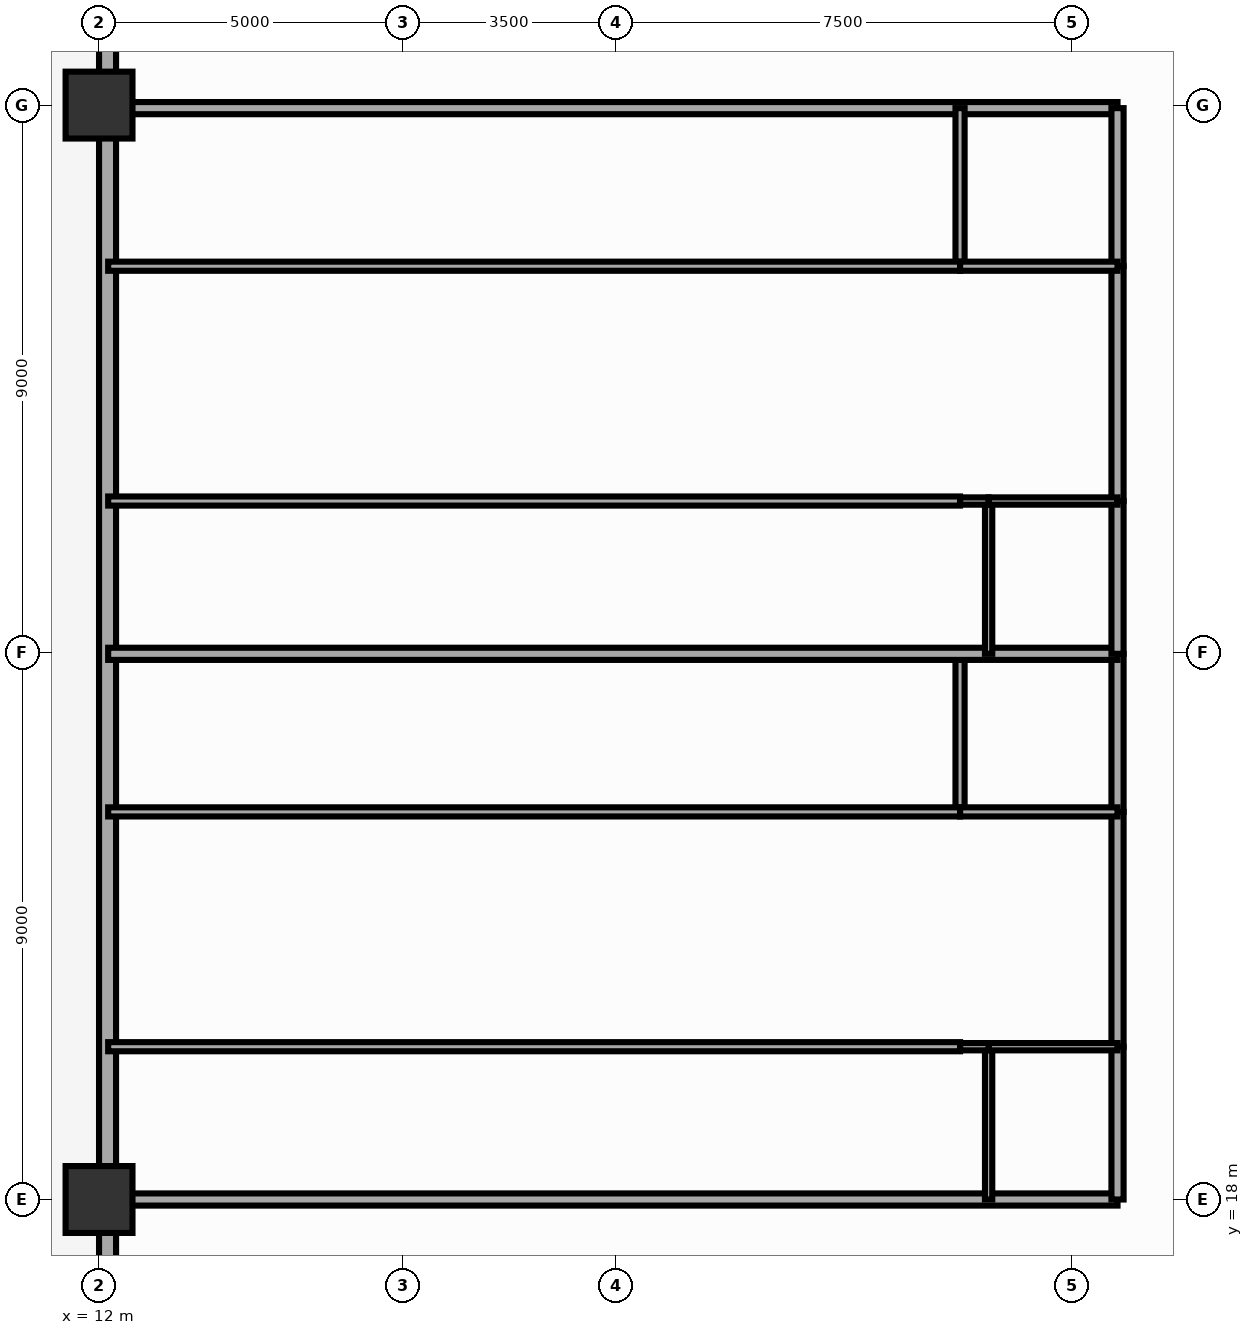
"""IFC4 building model, lengths in metres.
Left out: names, types, materials, properties, quantities, classifications, styles, units other than length and angle.
Written with IfcOpenShell. Run it as: python <this file> out.ifc"""

import sys

from ifc_helpers import new_model, si_unit, direction, frame, frame_2d, origin, origin_2d, place, context, subcontext, project, spatial, rectangle, extrude, source, transform, mapped, element, fill, save


model = new_model("IFC4")
c1 = context("Model", 3, precision=1e-05, world=origin(), true_north=direction((0.0, 1.0)))
c2 = subcontext(c1, "Body", "Model", "MODEL_VIEW")
j1 = project(units=[si_unit("LENGTHUNIT", "METRE"), si_unit("PLANEANGLEUNIT", "RADIAN")], contexts=[c1])
p1 = place(None, origin())
s1 = spatial("IfcSite", under=j1, at=p1, CompositionType="ELEMENT")
p2 = place(p1, origin())
s2 = spatial("IfcBuilding", under=s1, at=p2, CompositionType="ELEMENT")
p3 = place(p2, frame((0.0, 0.0, 19.4)))
s3 = spatial("IfcBuildingStorey", under=s2, at=p3, CompositionType="ELEMENT", Elevation=19.4)
m1 = source(origin(), c2, "Body", "SweptSolid", [
    extrude(rectangle(XDim=1.1, YDim=1.1, at=origin_2d()), origin(), (0.0, 0.0, 1.0), 3.0),
])
for number, where, z_axis, x_axis in (
    (1, (12.0, 36.0, 0.0), (0.0, 0.0, 1.0), (1.0, 0.0, 0.0)),
    (2, (12.0, 18.0, 0.0), (0.0, 0.0, 1.0), (1.0, 0.0, 0.0)),
):
    element("IfcColumn", number, at=place(p3, frame(where, z_axis=z_axis, x_axis=x_axis)), inside=s3, PredefinedType="COLUMN", context=c2, shape_type="MappedRepresentation", body=[
        mapped(m1, transform((0.0, 0.0, 0.0), scale=1.0)),
    ])
p4 = place(p3, frame((12.14, 6.5, 0.0), z_axis=(0.0, 0.0, 1.0), x_axis=(0.0, 1.0, 0.0)))
e3 = element("IfcWall", 3, at=p4, inside=s3, PredefinedType="SOLIDWALL", context=c2, shape_type="SweptSolid", body=[
    extrude(rectangle(XDim=41.0, YDim=0.28, at=frame_2d((20.5, 0.0))), origin(), (0.0, 0.0, 1.0), 2.28),
])
p5 = place(p4, frame((5.15, 0.0, 0.25)))
e4 = element("IfcOpeningElement", 4, at=p5, cuts=e3, PredefinedType="OPENING", context=c2, shape_type="SweptSolid", body=[
    extrude(rectangle(XDim=1.2, YDim=1.5, at=frame_2d((0.6, 0.75))), frame((0.0, 0.152, 0.0), z_axis=(0.0, -1.0, 0.0), x_axis=(1.0, 0.0, 0.0)), (0.0, 0.0, 1.0), 0.304),
])
p6 = place(p4, frame((12.352, 0.0, 0.25)))
e5 = element("IfcOpeningElement", 5, at=p6, cuts=e3, PredefinedType="OPENING", context=c2, shape_type="SweptSolid", body=[
    extrude(rectangle(XDim=1.2, YDim=1.5, at=frame_2d((0.6, 0.75))), frame((0.0, 0.152, 0.0), z_axis=(0.0, -1.0, 0.0), x_axis=(1.0, 0.0, 0.0)), (0.0, 0.0, 1.0), 0.304),
])
p7 = place(p4, frame((15.344, 0.0, 0.25)))
e6 = element("IfcOpeningElement", 6, at=p7, cuts=e3, PredefinedType="OPENING", context=c2, shape_type="SweptSolid", body=[
    extrude(rectangle(XDim=1.2, YDim=1.5, at=frame_2d((0.6, 0.75))), frame((0.0, 0.152, 0.0), z_axis=(0.0, -1.0, 0.0), x_axis=(1.0, 0.0, 0.0)), (0.0, 0.0, 1.0), 0.304),
])
p8 = place(p4, frame((18.575, 0.0, 0.25)))
e7 = element("IfcOpeningElement", 7, at=p8, cuts=e3, PredefinedType="OPENING", context=c2, shape_type="SweptSolid", body=[
    extrude(rectangle(XDim=1.2, YDim=1.5, at=frame_2d((0.6, 0.75))), frame((0.0, 0.152, 0.0), z_axis=(0.0, -1.0, 0.0), x_axis=(1.0, 0.0, 0.0)), (0.0, 0.0, 1.0), 0.304),
])
p9 = place(p4, frame((21.132, 0.0, 0.25)))
e8 = element("IfcOpeningElement", 8, at=p9, cuts=e3, PredefinedType="OPENING", context=c2, shape_type="SweptSolid", body=[
    extrude(rectangle(XDim=1.2, YDim=1.5, at=frame_2d((0.6, 0.75))), frame((0.0, 0.152, 0.0), z_axis=(0.0, -1.0, 0.0), x_axis=(1.0, 0.0, 0.0)), (0.0, 0.0, 1.0), 0.304),
])
p10 = place(p4, frame((24.319, 0.0, 0.25)))
e9 = element("IfcOpeningElement", 9, at=p10, cuts=e3, PredefinedType="OPENING", context=c2, shape_type="SweptSolid", body=[
    extrude(rectangle(XDim=1.2, YDim=1.5, at=frame_2d((0.6, 0.75))), frame((0.0, 0.152, 0.0), z_axis=(0.0, -1.0, 0.0), x_axis=(1.0, 0.0, 0.0)), (0.0, 0.0, 1.0), 0.304),
])
p11 = place(p4, frame((27.38, 0.0, 0.25)))
e10 = element("IfcOpeningElement", 10, at=p11, cuts=e3, PredefinedType="OPENING", context=c2, shape_type="SweptSolid", body=[
    extrude(rectangle(XDim=1.2, YDim=1.5, at=frame_2d((0.6, 0.75))), frame((0.0, 0.152, 0.0), z_axis=(0.0, -1.0, 0.0), x_axis=(1.0, 0.0, 0.0)), (0.0, 0.0, 1.0), 0.304),
])
p12 = place(p4, frame((34.45, 0.0, 0.0)))
e11 = element("IfcOpeningElement", 11, at=p12, cuts=e3, PredefinedType="OPENING", context=c2, shape_type="SweptSolid", body=[
    extrude(rectangle(XDim=1.6, YDim=2.15, at=frame_2d((0.8, 1.075))), frame((0.0, 0.152, 0.0), z_axis=(0.0, -1.0, 0.0), x_axis=(1.0, 0.0, 0.0)), (0.0, 0.0, 1.0), 0.304),
])
for number, where, z_axis, x_axis in (
    (12, (28.75, 18.0, 0.0), (0.0, 0.0, 1.0), (-1.0, 0.0, 0.0)),
    (13, (28.75, 35.95, 0.0), (0.0, 0.0, 1.0), (-1.0, 0.0, 0.0)),
):
    element("IfcWall", number, at=place(p3, frame(where, z_axis=z_axis, x_axis=x_axis)), inside=s3, PredefinedType="PARTITIONING", context=c2, shape_type="SweptSolid", body=[
        extrude(rectangle(XDim=16.6, YDim=0.2, at=frame_2d((8.3, 0.0))), origin(), (0.0, 0.0, 1.0), 2.24),
    ])
p13 = place(p3, frame((28.75, 18.0, 0.0), z_axis=(0.0, 0.0, 1.0), x_axis=(0.0, 1.0, 0.0)))
e14 = element("IfcWall", 14, at=p13, inside=s3, PredefinedType="PARTITIONING", context=c2, shape_type="SweptSolid", body=[
    extrude(rectangle(XDim=2.513, YDim=0.2, at=frame_2d((1.256, 0.0))), origin(), (0.0, 0.0, 1.0), 2.79),
])
p14 = place(p3, frame((28.75, 20.513, 0.0), z_axis=(0.0, 0.0, 1.0), x_axis=(0.0, 1.0, 0.0)))
e15 = element("IfcWall", 15, at=p14, inside=s3, PredefinedType="PARTITIONING", context=c2, shape_type="SweptSolid", body=[
    extrude(rectangle(XDim=3.862, YDim=0.2, at=frame_2d((1.931, 0.0))), origin(), (0.0, 0.0, 1.0), 2.79),
])
p15 = place(p14, frame((1.431, 0.0, 0.0)))
e16 = element("IfcOpeningElement", 16, at=p15, cuts=e15, PredefinedType="OPENING", context=c2, shape_type="SweptSolid", body=[
    extrude(rectangle(XDim=1.0, YDim=2.15, at=frame_2d((0.5, 1.075))), frame((0.0, 0.112, 0.0), z_axis=(0.0, -1.0, 0.0), x_axis=(1.0, 0.0, 0.0)), (0.0, 0.0, 1.0), 0.224),
])
p16 = place(p3, frame((28.75, 24.375, 0.0), z_axis=(0.0, 0.0, 1.0), x_axis=(0.0, 1.0, 0.0)))
e17 = element("IfcWall", 17, at=p16, inside=s3, PredefinedType="PARTITIONING", context=c2, shape_type="SweptSolid", body=[
    extrude(rectangle(XDim=2.6, YDim=0.2, at=frame_2d((1.3, 0.0))), origin(), (0.0, 0.0, 1.0), 2.79),
])
p17 = place(p3, frame((26.63, 18.0, 0.0), z_axis=(0.0, 0.0, 1.0), x_axis=(0.0, 1.0, 0.0)))
e18 = element("IfcWall", 18, at=p17, inside=s3, PredefinedType="PARTITIONING", context=c2, shape_type="SweptSolid", body=[
    extrude(rectangle(XDim=2.513, YDim=0.12, at=frame_2d((1.256, 0.0))), origin(), (0.0, 0.0, 1.0), 2.79),
])
p18 = place(p3, frame((26.16, 24.375, 0.0), z_axis=(0.0, 0.0, 1.0), x_axis=(0.0, 1.0, 0.0)))
e19 = element("IfcWall", 19, at=p18, inside=s3, PredefinedType="PARTITIONING", context=c2, shape_type="SweptSolid", body=[
    extrude(rectangle(XDim=2.6, YDim=0.15, at=frame_2d((1.3, 0.0))), origin(), (0.0, 0.0, 1.0), 2.79),
])
p19 = place(p3, frame((28.75, 20.513, 0.0), z_axis=(0.0, 0.0, 1.0), x_axis=(-1.0, 0.0, 0.0)))
e20 = element("IfcWall", 20, at=p19, inside=s3, PredefinedType="PARTITIONING", context=c2, shape_type="SweptSolid", body=[
    extrude(rectangle(XDim=2.12, YDim=0.12, at=frame_2d((1.06, 0.0))), origin(), (0.0, 0.0, 1.0), 2.79),
])
p20 = place(p19, frame((0.635, 0.0, 0.0)))
e21 = element("IfcOpeningElement", 21, at=p20, cuts=e20, PredefinedType="OPENING", context=c2, shape_type="SweptSolid", body=[
    extrude(rectangle(XDim=0.85, YDim=2.05, at=frame_2d((0.425, 1.025))), frame((0.0, 0.072, 0.0), z_axis=(0.0, -1.0, 0.0), x_axis=(1.0, 0.0, 0.0)), (0.0, 0.0, 1.0), 0.144),
])
p21 = place(p3, frame((26.63, 20.513, 0.0), z_axis=(0.0, 0.0, 1.0), x_axis=(-1.0, 0.0, 0.0)))
e22 = element("IfcWall", 22, at=p21, inside=s3, PredefinedType="PARTITIONING", context=c2, shape_type="SweptSolid", body=[
    extrude(rectangle(XDim=0.47, YDim=0.12, at=frame_2d((0.235, 0.0))), origin(), (0.0, 0.0, 1.0), 2.79),
])
p22 = place(p3, frame((26.16, 20.513, 0.0), z_axis=(0.0, 0.0, 1.0), x_axis=(-1.0, 0.0, 0.0)))
e23 = element("IfcWall", 23, at=p22, inside=s3, PredefinedType="PARTITIONING", context=c2, shape_type="SweptSolid", body=[
    extrude(rectangle(XDim=14.01, YDim=0.15, at=frame_2d((7.005, 0.0))), origin(), (0.0, 0.0, 1.0), 2.79),
])
p23 = place(p22, frame((6.029, 0.0, 0.0)))
e24 = element("IfcOpeningElement", 24, at=p23, cuts=e23, PredefinedType="OPENING", context=c2, shape_type="SweptSolid", body=[
    extrude(rectangle(XDim=0.9, YDim=2.1, at=frame_2d((0.45, 1.05))), frame((0.0, 0.087, 0.0), z_axis=(0.0, -1.0, 0.0), x_axis=(1.0, 0.0, 0.0)), (0.0, 0.0, 1.0), 0.174),
])
p24 = place(p3, frame((28.75, 24.375, 0.0), z_axis=(0.0, 0.0, 1.0), x_axis=(-1.0, 0.0, 0.0)))
e25 = element("IfcWall", 25, at=p24, inside=s3, PredefinedType="PARTITIONING", context=c2, shape_type="SweptSolid", body=[
    extrude(rectangle(XDim=2.59, YDim=0.15, at=frame_2d((1.295, 0.0))), origin(), (0.0, 0.0, 1.0), 2.79),
])
p25 = place(p24, frame((0.845, 0.0, 0.0)))
e26 = element("IfcOpeningElement", 26, at=p25, cuts=e25, PredefinedType="OPENING", context=c2, shape_type="SweptSolid", body=[
    extrude(rectangle(XDim=0.9, YDim=2.1, at=frame_2d((0.45, 1.05))), frame((0.0, 0.087, 0.0), z_axis=(0.0, -1.0, 0.0), x_axis=(1.0, 0.0, 0.0)), (0.0, 0.0, 1.0), 0.174),
])
p26 = place(p3, frame((26.16, 24.375, 0.0), z_axis=(0.0, 0.0, 1.0), x_axis=(-1.0, 0.0, 0.0)))
e27 = element("IfcWall", 27, at=p26, inside=s3, PredefinedType="PARTITIONING", context=c2, shape_type="SweptSolid", body=[
    extrude(rectangle(XDim=14.01, YDim=0.15, at=frame_2d((7.005, 0.0))), origin(), (0.0, 0.0, 1.0), 2.79),
])
p27 = place(p26, frame((6.029, 0.0, 0.0)))
e28 = element("IfcOpeningElement", 28, at=p27, cuts=e27, PredefinedType="OPENING", context=c2, shape_type="SweptSolid", body=[
    extrude(rectangle(XDim=0.9, YDim=2.1, at=frame_2d((0.45, 1.05))), frame((0.0, 0.087, 0.0), z_axis=(0.0, -1.0, 0.0), x_axis=(1.0, 0.0, 0.0)), (0.0, 0.0, 1.0), 0.174),
])
p28 = place(p3, frame((28.75, 26.975, 0.0), z_axis=(0.0, 0.0, 1.0), x_axis=(-1.0, 0.0, 0.0)))
e29 = element("IfcWall", 29, at=p28, inside=s3, PredefinedType="PARTITIONING", context=c2, shape_type="SweptSolid", body=[
    extrude(rectangle(XDim=16.6, YDim=0.2, at=frame_2d((8.3, 0.0))), origin(), (0.0, 0.0, 1.0), 2.79),
])
p29 = place(p3, frame((28.75, 26.975, 0.0), z_axis=(0.0, 0.0, 1.0), x_axis=(0.0, 1.0, 0.0)))
e30 = element("IfcWall", 30, at=p29, inside=s3, PredefinedType="PARTITIONING", context=c2, shape_type="SweptSolid", body=[
    extrude(rectangle(XDim=2.513, YDim=0.2, at=frame_2d((1.256, 0.0))), origin(), (0.0, 0.0, 1.0), 2.79),
])
p30 = place(p3, frame((28.75, 29.488, 0.0), z_axis=(0.0, 0.0, 1.0), x_axis=(0.0, 1.0, 0.0)))
e31 = element("IfcWall", 31, at=p30, inside=s3, PredefinedType="PARTITIONING", context=c2, shape_type="SweptSolid", body=[
    extrude(rectangle(XDim=3.862, YDim=0.2, at=frame_2d((1.931, 0.0))), origin(), (0.0, 0.0, 1.0), 2.79),
])
p31 = place(p30, frame((1.431, 0.0, 0.0)))
e32 = element("IfcOpeningElement", 32, at=p31, cuts=e31, PredefinedType="OPENING", context=c2, shape_type="SweptSolid", body=[
    extrude(rectangle(XDim=1.0, YDim=2.15, at=frame_2d((0.5, 1.075))), frame((0.0, 0.112, 0.0), z_axis=(0.0, -1.0, 0.0), x_axis=(1.0, 0.0, 0.0)), (0.0, 0.0, 1.0), 0.224),
])
p32 = place(p3, frame((28.75, 33.35, 0.0), z_axis=(0.0, 0.0, 1.0), x_axis=(0.0, 1.0, 0.0)))
e33 = element("IfcWall", 33, at=p32, inside=s3, PredefinedType="PARTITIONING", context=c2, shape_type="SweptSolid", body=[
    extrude(rectangle(XDim=2.6, YDim=0.2, at=frame_2d((1.3, 0.0))), origin(), (0.0, 0.0, 1.0), 2.79),
])
p33 = place(p3, frame((26.63, 26.975, 0.0), z_axis=(0.0, 0.0, 1.0), x_axis=(0.0, 1.0, 0.0)))
e34 = element("IfcWall", 34, at=p33, inside=s3, PredefinedType="PARTITIONING", context=c2, shape_type="SweptSolid", body=[
    extrude(rectangle(XDim=2.513, YDim=0.12, at=frame_2d((1.256, 0.0))), origin(), (0.0, 0.0, 1.0), 2.79),
])
p34 = place(p3, frame((26.16, 33.35, 0.0), z_axis=(0.0, 0.0, 1.0), x_axis=(0.0, 1.0, 0.0)))
e35 = element("IfcWall", 35, at=p34, inside=s3, PredefinedType="PARTITIONING", context=c2, shape_type="SweptSolid", body=[
    extrude(rectangle(XDim=2.6, YDim=0.15, at=frame_2d((1.3, 0.0))), origin(), (0.0, 0.0, 1.0), 2.79),
])
p35 = place(p3, frame((28.75, 29.488, 0.0), z_axis=(0.0, 0.0, 1.0), x_axis=(-1.0, 0.0, 0.0)))
e36 = element("IfcWall", 36, at=p35, inside=s3, PredefinedType="PARTITIONING", context=c2, shape_type="SweptSolid", body=[
    extrude(rectangle(XDim=2.12, YDim=0.12, at=frame_2d((1.06, 0.0))), origin(), (0.0, 0.0, 1.0), 2.79),
])
p36 = place(p35, frame((0.635, 0.0, 0.0)))
e37 = element("IfcOpeningElement", 37, at=p36, cuts=e36, PredefinedType="OPENING", context=c2, shape_type="SweptSolid", body=[
    extrude(rectangle(XDim=0.85, YDim=2.05, at=frame_2d((0.425, 1.025))), frame((0.0, 0.072, 0.0), z_axis=(0.0, -1.0, 0.0), x_axis=(1.0, 0.0, 0.0)), (0.0, 0.0, 1.0), 0.144),
])
p37 = place(p3, frame((26.63, 29.488, 0.0), z_axis=(0.0, 0.0, 1.0), x_axis=(-1.0, 0.0, 0.0)))
e38 = element("IfcWall", 38, at=p37, inside=s3, PredefinedType="PARTITIONING", context=c2, shape_type="SweptSolid", body=[
    extrude(rectangle(XDim=0.47, YDim=0.12, at=frame_2d((0.235, 0.0))), origin(), (0.0, 0.0, 1.0), 2.79),
])
p38 = place(p3, frame((26.16, 29.488, 0.0), z_axis=(0.0, 0.0, 1.0), x_axis=(-1.0, 0.0, 0.0)))
e39 = element("IfcWall", 39, at=p38, inside=s3, PredefinedType="PARTITIONING", context=c2, shape_type="SweptSolid", body=[
    extrude(rectangle(XDim=14.01, YDim=0.15, at=frame_2d((7.005, 0.0))), origin(), (0.0, 0.0, 1.0), 2.79),
])
p39 = place(p38, frame((6.029, 0.0, 0.0)))
e40 = element("IfcOpeningElement", 40, at=p39, cuts=e39, PredefinedType="OPENING", context=c2, shape_type="SweptSolid", body=[
    extrude(rectangle(XDim=0.9, YDim=2.1, at=frame_2d((0.45, 1.05))), frame((0.0, 0.087, 0.0), z_axis=(0.0, -1.0, 0.0), x_axis=(1.0, 0.0, 0.0)), (0.0, 0.0, 1.0), 0.174),
])
p40 = place(p3, frame((28.75, 33.35, 0.0), z_axis=(0.0, 0.0, 1.0), x_axis=(-1.0, 0.0, 0.0)))
e41 = element("IfcWall", 41, at=p40, inside=s3, PredefinedType="PARTITIONING", context=c2, shape_type="SweptSolid", body=[
    extrude(rectangle(XDim=2.59, YDim=0.15, at=frame_2d((1.295, 0.0))), origin(), (0.0, 0.0, 1.0), 2.79),
])
p41 = place(p40, frame((0.845, 0.0, 0.0)))
e42 = element("IfcOpeningElement", 42, at=p41, cuts=e41, PredefinedType="OPENING", context=c2, shape_type="SweptSolid", body=[
    extrude(rectangle(XDim=0.9, YDim=2.1, at=frame_2d((0.45, 1.05))), frame((0.0, 0.087, 0.0), z_axis=(0.0, -1.0, 0.0), x_axis=(1.0, 0.0, 0.0)), (0.0, 0.0, 1.0), 0.174),
])
p42 = place(p3, frame((26.16, 33.35, 0.0), z_axis=(0.0, 0.0, 1.0), x_axis=(-1.0, 0.0, 0.0)))
e43 = element("IfcWall", 43, at=p42, inside=s3, PredefinedType="PARTITIONING", context=c2, shape_type="SweptSolid", body=[
    extrude(rectangle(XDim=14.01, YDim=0.15, at=frame_2d((7.005, 0.0))), origin(), (0.0, 0.0, 1.0), 2.79),
])
p43 = place(p42, frame((6.029, 0.0, 0.0)))
e44 = element("IfcOpeningElement", 44, at=p43, cuts=e43, PredefinedType="OPENING", context=c2, shape_type="SweptSolid", body=[
    extrude(rectangle(XDim=0.9, YDim=2.1, at=frame_2d((0.45, 1.05))), frame((0.0, 0.087, 0.0), z_axis=(0.0, -1.0, 0.0), x_axis=(1.0, 0.0, 0.0)), (0.0, 0.0, 1.0), 0.174),
])
m2 = source(origin(), c2, "Body", "SweptSolid", [
    extrude(rectangle(XDim=1.2, YDim=1.5, at=frame_2d((0.6, 0.75))), frame((0.0, 0.03, 0.0), z_axis=(0.0, -1.0, 0.0), x_axis=(1.0, 0.0, 0.0)), (0.0, 0.0, 1.0), 0.06),
])
p44 = place(p6, origin())
e45 = element("IfcWindow", 45, at=p44, inside=s3, PartitioningType="SINGLE_PANEL", PredefinedType="WINDOW", context=c2, shape_type="MappedRepresentation", body=[
    mapped(m2, transform((0.0, 0.0, 0.0), scale=1.0)),
])
fill(e5, e45)
p45 = place(p7, origin())
e46 = element("IfcWindow", 46, at=p45, inside=s3, PartitioningType="SINGLE_PANEL", PredefinedType="WINDOW", context=c2, shape_type="MappedRepresentation", body=[
    mapped(m2, transform((0.0, 0.0, 0.0), scale=1.0)),
])
fill(e6, e46)
p46 = place(p8, origin())
e47 = element("IfcWindow", 47, at=p46, inside=s3, PartitioningType="SINGLE_PANEL", PredefinedType="WINDOW", context=c2, shape_type="MappedRepresentation", body=[
    mapped(m2, transform((0.0, 0.0, 0.0), scale=1.0)),
])
fill(e7, e47)
p47 = place(p9, origin())
e48 = element("IfcWindow", 48, at=p47, inside=s3, PartitioningType="SINGLE_PANEL", PredefinedType="WINDOW", context=c2, shape_type="MappedRepresentation", body=[
    mapped(m2, transform((0.0, 0.0, 0.0), scale=1.0)),
])
fill(e8, e48)
p48 = place(p10, origin())
e49 = element("IfcWindow", 49, at=p48, inside=s3, PartitioningType="SINGLE_PANEL", PredefinedType="WINDOW", context=c2, shape_type="MappedRepresentation", body=[
    mapped(m2, transform((0.0, 0.0, 0.0), scale=1.0)),
])
fill(e9, e49)
p49 = place(p11, origin())
e50 = element("IfcWindow", 50, at=p49, inside=s3, PartitioningType="SINGLE_PANEL", PredefinedType="WINDOW", context=c2, shape_type="MappedRepresentation", body=[
    mapped(m2, transform((0.0, 0.0, 0.0), scale=1.0)),
])
fill(e10, e50)
m3 = source(origin(), c2, "Body", "SweptSolid", [
    extrude(rectangle(XDim=1.0, YDim=2.15, at=frame_2d((0.5, 1.075))), frame((0.0, 0.025, 0.0), z_axis=(0.0, -1.0, 0.0), x_axis=(1.0, 0.0, 0.0)), (0.0, 0.0, 1.0), 0.05),
])
p50 = place(p15, origin())
e51 = element("IfcDoor", 51, at=p50, inside=s3, OperationType="SINGLE_SWING_RIGHT", PredefinedType="DOOR", context=c2, shape_type="MappedRepresentation", body=[
    mapped(m3, transform((0.0, 0.0, 0.0), scale=1.0)),
])
fill(e16, e51)
m4 = source(origin(), c2, "Body", "SweptSolid", [
    extrude(rectangle(XDim=0.85, YDim=2.05, at=frame_2d((0.425, 1.025))), frame((0.0, 0.025, 0.0), z_axis=(0.0, -1.0, 0.0), x_axis=(1.0, 0.0, 0.0)), (0.0, 0.0, 1.0), 0.05),
])
p51 = place(p20, origin())
e52 = element("IfcDoor", 52, at=p51, inside=s3, OperationType="SINGLE_SWING_LEFT", PredefinedType="DOOR", context=c2, shape_type="MappedRepresentation", body=[
    mapped(m4, transform((0.0, 0.0, 0.0), scale=1.0)),
])
fill(e21, e52)
m5 = source(origin(), c2, "Body", "SweptSolid", [
    extrude(rectangle(XDim=0.9, YDim=2.1, at=frame_2d((0.45, 1.05))), frame((0.0, 0.025, 0.0), z_axis=(0.0, -1.0, 0.0), x_axis=(1.0, 0.0, 0.0)), (0.0, 0.0, 1.0), 0.05),
])
p52 = place(p23, origin())
e53 = element("IfcDoor", 53, at=p52, inside=s3, OperationType="SINGLE_SWING_RIGHT", PredefinedType="DOOR", context=c2, shape_type="MappedRepresentation", body=[
    mapped(m5, transform((0.0, 0.0, 0.0), scale=1.0)),
])
fill(e24, e53)
p53 = place(p25, origin())
e54 = element("IfcDoor", 54, at=p53, inside=s3, OperationType="SINGLE_SWING_LEFT", PredefinedType="DOOR", context=c2, shape_type="MappedRepresentation", body=[
    mapped(m5, transform((0.0, 0.0, 0.0), scale=1.0)),
])
fill(e26, e54)
p54 = place(p27, origin())
e55 = element("IfcDoor", 55, at=p54, inside=s3, OperationType="SINGLE_SWING_RIGHT", PredefinedType="DOOR", context=c2, shape_type="MappedRepresentation", body=[
    mapped(m5, transform((0.0, 0.0, 0.0), scale=1.0)),
])
fill(e28, e55)
p55 = place(p31, origin())
e56 = element("IfcDoor", 56, at=p55, inside=s3, OperationType="SINGLE_SWING_LEFT", PredefinedType="DOOR", context=c2, shape_type="MappedRepresentation", body=[
    mapped(m3, transform((0.0, 0.0, 0.0), scale=1.0)),
])
fill(e32, e56)
p56 = place(p36, origin())
e57 = element("IfcDoor", 57, at=p56, inside=s3, OperationType="SINGLE_SWING_RIGHT", PredefinedType="DOOR", context=c2, shape_type="MappedRepresentation", body=[
    mapped(m4, transform((0.0, 0.0, 0.0), scale=1.0)),
])
fill(e37, e57)
p57 = place(p39, origin())
e58 = element("IfcDoor", 58, at=p57, inside=s3, OperationType="SINGLE_SWING_LEFT", PredefinedType="DOOR", context=c2, shape_type="MappedRepresentation", body=[
    mapped(m5, transform((0.0, 0.0, 0.0), scale=1.0)),
])
fill(e40, e58)
p58 = place(p41, origin())
e59 = element("IfcDoor", 59, at=p58, inside=s3, OperationType="SINGLE_SWING_RIGHT", PredefinedType="DOOR", context=c2, shape_type="MappedRepresentation", body=[
    mapped(m5, transform((0.0, 0.0, 0.0), scale=1.0)),
])
fill(e42, e59)
p59 = place(p43, origin())
e60 = element("IfcDoor", 60, at=p59, inside=s3, OperationType="SINGLE_SWING_LEFT", PredefinedType="DOOR", context=c2, shape_type="MappedRepresentation", body=[
    mapped(m5, transform((0.0, 0.0, 0.0), scale=1.0)),
])
fill(e44, e60)
save(model, sys.argv[1])
